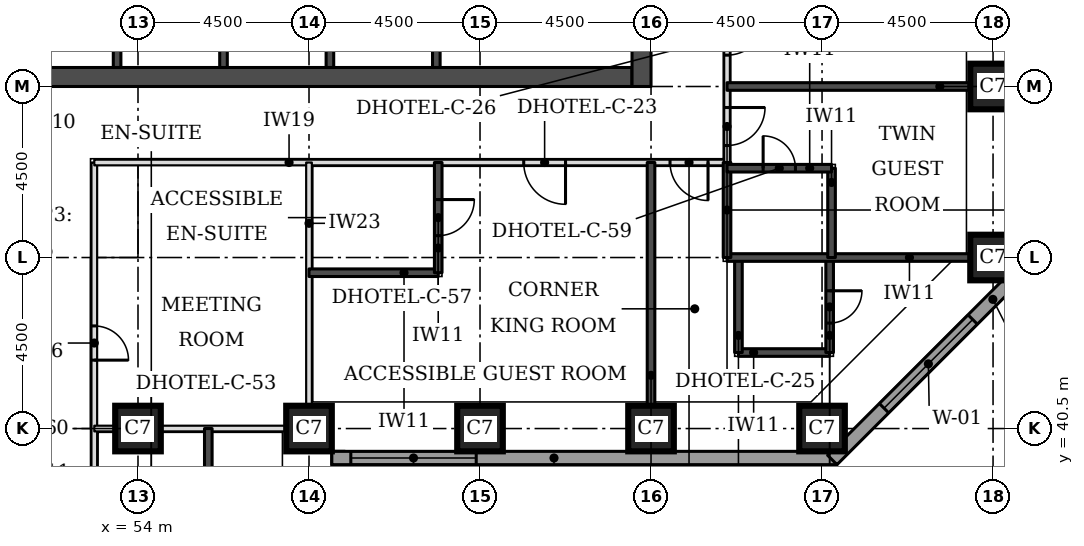
"""IFC4 building model, lengths in metres.
Left out: names, types, materials, properties, quantities, classifications, styles, units other than length and angle.
Written with IfcOpenShell. Run it as: python <this file> out.ifc"""

import sys

from ifc_helpers import new_model, si_unit, direction, frame, frame_2d, origin, origin_2d, place, context, subcontext, project, spatial, rectangle, extrude, element, fill, save


model = new_model("IFC4")
c1 = context("Model", 3, precision=1e-05, world=origin(), true_north=direction((0.0, 1.0)))
c2 = subcontext(c1, "Body", "Model", "MODEL_VIEW")
j1 = project(units=[si_unit("LENGTHUNIT", "METRE"), si_unit("PLANEANGLEUNIT", "RADIAN")], contexts=[c1])
p1 = place(None, origin())
s1 = spatial("IfcSite", under=j1, at=p1, CompositionType="ELEMENT")
p2 = place(p1, origin())
s2 = spatial("IfcBuilding", under=s1, at=p2, CompositionType="ELEMENT")
p3 = place(p2, frame((0.0, 0.0, 33.0)))
s3 = spatial("IfcBuildingStorey", under=s2, at=p3, CompositionType="ELEMENT", Elevation=33.0)
for number, where, z_axis, x_axis in (
    (1, (54.0, 40.5, 0.0), (0.0, 0.0, 1.0), (1.0, 0.0, 0.0)),
    (2, (58.5, 40.5, 0.0), (0.0, 0.0, 1.0), (1.0, 0.0, 0.0)),
    (3, (63.0, 40.5, 0.0), (0.0, 0.0, 1.0), (1.0, 0.0, 0.0)),
    (4, (67.5, 40.5, 0.0), (0.0, 0.0, 1.0), (1.0, 0.0, 0.0)),
    (5, (72.0, 40.5, 0.0), (0.0, 0.0, 1.0), (1.0, 0.0, 0.0)),
    (6, (76.5, 45.0, 0.0), (0.0, 0.0, 1.0), (1.0, 0.0, 0.0)),
    (7, (76.5, 49.5, 0.0), (0.0, 0.0, 1.0), (1.0, 0.0, 0.0)),
):
    element("IfcColumn", number, at=place(p3, frame(where, z_axis=z_axis, x_axis=x_axis)), inside=s3, PredefinedType="COLUMN", context=c2, shape_type="SweptSolid", body=[
        extrude(rectangle(XDim=1.2, YDim=1.2, at=origin_2d()), origin(), (0.0, 0.0, 1.0), 3.3),
    ])
p4 = place(p3, frame((45.5, 49.75, 0.0), z_axis=(0.0, 0.0, 1.0), x_axis=(1.0, 0.0, 0.0)))
e8 = element("IfcWall", 8, at=p4, inside=s3, PredefinedType="SHEAR", context=c2, shape_type="SweptSolid", body=[
    extrude(rectangle(XDim=21.5, YDim=0.5, at=frame_2d((10.75, 0.0))), origin(), (0.0, 0.0, 1.0), 3.3),
])
p5 = place(p3, frame((67.25, 49.5, 0.0), z_axis=(0.0, 0.0, 1.0), x_axis=(0.0, 1.0, 0.0)))
e9 = element("IfcWall", 9, at=p5, inside=s3, PredefinedType="SHEAR", context=c2, shape_type="SweptSolid", body=[
    extrude(rectangle(XDim=22.5, YDim=0.5, at=frame_2d((11.25, 0.0))), origin(), (0.0, 0.0, 1.0), 3.3),
])
p6 = place(p5, frame((4.2, 0.0, 0.0)))
e10 = element("IfcOpeningElement", 10, at=p6, cuts=e9, PredefinedType="OPENING", context=c2, shape_type="SweptSolid", body=[
    extrude(rectangle(XDim=1.8, YDim=2.1, at=frame_2d((0.9, 1.05))), frame((0.0, 0.26, 0.0), z_axis=(0.0, -1.0, 0.0), x_axis=(1.0, 0.0, 0.0)), (0.0, 0.0, 1.0), 0.52),
])
p7 = place(p5, frame((6.9, 0.0, 0.0)))
e11 = element("IfcOpeningElement", 11, at=p7, cuts=e9, PredefinedType="OPENING", context=c2, shape_type="SweptSolid", body=[
    extrude(rectangle(XDim=1.1, YDim=2.1, at=frame_2d((0.55, 1.05))), frame((0.0, 0.26, 0.0), z_axis=(0.0, -1.0, 0.0), x_axis=(1.0, 0.0, 0.0)), (0.0, 0.0, 1.0), 0.52),
])
p8 = place(p5, frame((13.6, 0.0, 0.0)))
e12 = element("IfcOpeningElement", 12, at=p8, cuts=e9, PredefinedType="OPENING", context=c2, shape_type="SweptSolid", body=[
    extrude(rectangle(XDim=1.1, YDim=2.1, at=frame_2d((0.55, 1.05))), frame((0.0, 0.26, 0.0), z_axis=(0.0, -1.0, 0.0), x_axis=(1.0, 0.0, 0.0)), (0.0, 0.0, 1.0), 0.52),
])
p9 = place(p5, frame((16.5, 0.0, 0.0)))
e13 = element("IfcOpeningElement", 13, at=p9, cuts=e9, PredefinedType="OPENING", context=c2, shape_type="SweptSolid", body=[
    extrude(rectangle(XDim=1.8, YDim=2.1, at=frame_2d((0.9, 1.05))), frame((0.0, 0.26, 0.0), z_axis=(0.0, -1.0, 0.0), x_axis=(1.0, 0.0, 0.0)), (0.0, 0.0, 1.0), 0.52),
])
p10 = place(p3, frame((59.275, 22.106, 0.0), z_axis=(0.0, 0.0, 1.0), x_axis=(0.0, 1.0, 0.0)))
e14 = element("IfcWall", 14, at=p10, inside=s3, PredefinedType="STANDARD", context=c2, shape_type="SweptSolid", body=[
    extrude(rectangle(XDim=17.793, YDim=0.35, at=frame_2d((8.897, 0.0))), origin(), (0.0, 0.0, 1.0), 3.055),
])
p11 = place(p10, frame((5.493, 0.0, 0.8)))
e15 = element("IfcOpeningElement", 15, at=p11, cuts=e14, PredefinedType="OPENING", context=c2, shape_type="SweptSolid", body=[
    extrude(rectangle(XDim=3.3, YDim=1.5, at=frame_2d((1.65, 0.75))), frame((0.0, 0.185, 0.0), z_axis=(0.0, -1.0, 0.0), x_axis=(1.0, 0.0, 0.0)), (0.0, 0.0, 1.0), 0.37),
])
p12 = place(p10, frame((13.993, 0.0, 0.8)))
e16 = element("IfcOpeningElement", 16, at=p12, cuts=e14, PredefinedType="OPENING", context=c2, shape_type="SweptSolid", body=[
    extrude(rectangle(XDim=3.3, YDim=1.5, at=frame_2d((1.65, 0.75))), frame((0.0, 0.185, 0.0), z_axis=(0.0, -1.0, 0.0), x_axis=(1.0, 0.0, 0.0)), (0.0, 0.0, 1.0), 0.37),
])
p13 = place(p3, frame((59.1, 39.725, 0.0), z_axis=(0.0, 0.0, 1.0), x_axis=(1.0, 0.0, 0.0)))
e17 = element("IfcWall", 17, at=p13, inside=s3, PredefinedType="STANDARD", context=c2, shape_type="SweptSolid", body=[
    extrude(rectangle(XDim=13.293, YDim=0.35, at=frame_2d((6.647, 0.0))), origin(), (0.0, 0.0, 1.0), 3.055),
])
p14 = place(p13, frame((0.5, 0.0, 0.8)))
e18 = element("IfcOpeningElement", 18, at=p14, cuts=e17, PredefinedType="OPENING", context=c2, shape_type="SweptSolid", body=[
    extrude(rectangle(XDim=3.3, YDim=1.5, at=frame_2d((1.65, 0.75))), frame((0.0, 0.185, 0.0), z_axis=(0.0, -1.0, 0.0), x_axis=(1.0, 0.0, 0.0)), (0.0, 0.0, 1.0), 0.37),
])
p15 = place(p3, frame((72.27, 39.674, 0.0), z_axis=(0.0, 0.0, 1.0), x_axis=(0.707106781187, 0.707106781187, 0.0)))
e19 = element("IfcWall", 19, at=p15, inside=s3, PredefinedType="STANDARD", context=c2, shape_type="SweptSolid", body=[
    extrude(rectangle(XDim=7.151, YDim=0.35, at=frame_2d((3.576, 0.0))), origin(), (0.0, 0.0, 1.0), 3.055),
])
p16 = place(p15, frame((1.926, 0.0, 0.8)))
e20 = element("IfcOpeningElement", 20, at=p16, cuts=e19, PredefinedType="OPENING", context=c2, shape_type="SweptSolid", body=[
    extrude(rectangle(XDim=3.3, YDim=1.5, at=frame_2d((1.65, 0.75))), frame((0.0, 0.185, 0.0), z_axis=(0.0, -1.0, 0.0), x_axis=(1.0, 0.0, 0.0)), (0.0, 0.0, 1.0), 0.37),
])
p17 = place(p3, frame((52.85, 25.15, 0.0), z_axis=(0.0, 0.0, 1.0), x_axis=(0.0, 1.0, 0.0)))
e21 = element("IfcWall", 21, at=p17, inside=s3, PredefinedType="PARTITIONING", context=c2, shape_type="SweptSolid", body=[
    extrude(rectangle(XDim=22.35, YDim=0.15, at=frame_2d((11.175, 0.0))), origin(), (0.0, 0.0, 1.0), 3.08),
])
p18 = place(p17, frame((0.347, 0.0, 0.0)))
e22 = element("IfcOpeningElement", 22, at=p18, cuts=e21, PredefinedType="OPENING", context=c2, shape_type="SweptSolid", body=[
    extrude(rectangle(XDim=1.0, YDim=2.1, at=frame_2d((0.5, 1.05))), frame((0.0, 0.085, 0.0), z_axis=(0.0, -1.0, 0.0), x_axis=(1.0, 0.0, 0.0)), (0.0, 0.0, 1.0), 0.17),
])
p19 = place(p17, frame((7.075, 0.0, 0.0)))
e23 = element("IfcOpeningElement", 23, at=p19, cuts=e21, PredefinedType="OPENING", context=c2, shape_type="SweptSolid", body=[
    extrude(rectangle(XDim=1.0, YDim=2.1, at=frame_2d((0.5, 1.05))), frame((0.0, 0.085, 0.0), z_axis=(0.0, -1.0, 0.0), x_axis=(1.0, 0.0, 0.0)), (0.0, 0.0, 1.0), 0.17),
])
p20 = place(p17, frame((11.425, 0.0, 0.0)))
e24 = element("IfcOpeningElement", 24, at=p20, cuts=e21, PredefinedType="OPENING", context=c2, shape_type="SweptSolid", body=[
    extrude(rectangle(XDim=1.0, YDim=2.1, at=frame_2d((0.5, 1.05))), frame((0.0, 0.085, 0.0), z_axis=(0.0, -1.0, 0.0), x_axis=(1.0, 0.0, 0.0)), (0.0, 0.0, 1.0), 0.17),
])
p21 = place(p17, frame((17.15, 0.0, 0.0)))
e25 = element("IfcOpeningElement", 25, at=p21, cuts=e21, PredefinedType="OPENING", context=c2, shape_type="SweptSolid", body=[
    extrude(rectangle(XDim=0.9, YDim=2.1, at=frame_2d((0.45, 1.05))), frame((0.0, 0.085, 0.0), z_axis=(0.0, -1.0, 0.0), x_axis=(1.0, 0.0, 0.0)), (0.0, 0.0, 1.0), 0.17),
])
p22 = place(p3, frame((52.85, 47.5, 0.0), z_axis=(0.0, 0.0, 1.0), x_axis=(1.0, 0.0, 0.0)))
e26 = element("IfcWall", 26, at=p22, inside=s3, PredefinedType="PARTITIONING", context=c2, shape_type="SweptSolid", body=[
    extrude(rectangle(XDim=16.65, YDim=0.15, at=frame_2d((8.325, 0.0))), origin(), (0.0, 0.0, 1.0), 3.08),
])
p23 = place(p22, frame((11.3, 0.0, 0.0)))
e27 = element("IfcOpeningElement", 27, at=p23, cuts=e26, PredefinedType="OPENING", context=c2, shape_type="SweptSolid", body=[
    extrude(rectangle(XDim=1.1, YDim=2.1, at=frame_2d((0.55, 1.05))), frame((0.0, 0.085, 0.0), z_axis=(0.0, -1.0, 0.0), x_axis=(1.0, 0.0, 0.0)), (0.0, 0.0, 1.0), 0.17),
])
p24 = place(p22, frame((15.15, 0.0, 0.0)))
e28 = element("IfcOpeningElement", 28, at=p24, cuts=e26, PredefinedType="OPENING", context=c2, shape_type="SweptSolid", body=[
    extrude(rectangle(XDim=1.0, YDim=2.1, at=frame_2d((0.5, 1.05))), frame((0.0, 0.085, 0.0), z_axis=(0.0, -1.0, 0.0), x_axis=(1.0, 0.0, 0.0)), (0.0, 0.0, 1.0), 0.17),
])
p25 = place(p3, frame((69.5, 47.5, 0.0), z_axis=(0.0, 0.0, 1.0), x_axis=(0.0, 1.0, 0.0)))
e29 = element("IfcWall", 29, at=p25, inside=s3, PredefinedType="PARTITIONING", context=c2, shape_type="SweptSolid", body=[
    extrude(rectangle(XDim=26.5, YDim=0.15, at=frame_2d((13.25, 0.0))), origin(), (0.0, 0.0, 1.0), 3.08),
])
p26 = place(p25, frame((25.053, 0.0, 0.0)))
e30 = element("IfcOpeningElement", 30, at=p26, cuts=e29, PredefinedType="OPENING", context=c2, shape_type="SweptSolid", body=[
    extrude(rectangle(XDim=1.0, YDim=2.1, at=frame_2d((0.5, 1.05))), frame((0.0, 0.085, 0.0), z_axis=(0.0, -1.0, 0.0), x_axis=(1.0, 0.0, 0.0)), (0.0, 0.0, 1.0), 0.17),
])
p27 = place(p25, frame((18.275, 0.0, 0.0)))
e31 = element("IfcOpeningElement", 31, at=p27, cuts=e29, PredefinedType="OPENING", context=c2, shape_type="SweptSolid", body=[
    extrude(rectangle(XDim=1.0, YDim=2.1, at=frame_2d((0.5, 1.05))), frame((0.0, 0.085, 0.0), z_axis=(0.0, -1.0, 0.0), x_axis=(1.0, 0.0, 0.0)), (0.0, 0.0, 1.0), 0.17),
])
p28 = place(p25, frame((12.15, 0.0, 0.0)))
e32 = element("IfcOpeningElement", 32, at=p28, cuts=e29, PredefinedType="OPENING", context=c2, shape_type="SweptSolid", body=[
    extrude(rectangle(XDim=1.1, YDim=2.1, at=frame_2d((0.55, 1.05))), frame((0.0, 0.085, 0.0), z_axis=(0.0, -1.0, 0.0), x_axis=(1.0, 0.0, 0.0)), (0.0, 0.0, 1.0), 0.17),
])
p29 = place(p25, frame((2.825, 0.0, 0.0)))
e33 = element("IfcOpeningElement", 33, at=p29, cuts=e29, PredefinedType="OPENING", context=c2, shape_type="SweptSolid", body=[
    extrude(rectangle(XDim=1.0, YDim=2.1, at=frame_2d((0.5, 1.05))), frame((0.0, 0.085, 0.0), z_axis=(0.0, -1.0, 0.0), x_axis=(1.0, 0.0, 0.0)), (0.0, 0.0, 1.0), 0.17),
])
p30 = place(p25, frame((0.447, 0.0, 0.0)))
e34 = element("IfcOpeningElement", 34, at=p30, cuts=e29, PredefinedType="OPENING", context=c2, shape_type="SweptSolid", body=[
    extrude(rectangle(XDim=1.0, YDim=2.1, at=frame_2d((0.5, 1.05))), frame((0.0, 0.085, 0.0), z_axis=(0.0, -1.0, 0.0), x_axis=(1.0, 0.0, 0.0)), (0.0, 0.0, 1.0), 0.17),
])
p31 = place(p3, frame((55.85, 38.15, 0.0), z_axis=(0.0, 0.0, 1.0), x_axis=(0.0, 1.0, 0.0)))
e35 = element("IfcWall", 35, at=p31, inside=s3, PredefinedType="SOLIDWALL", context=c2, shape_type="SweptSolid", body=[
    extrude(rectangle(XDim=2.35, YDim=0.2, at=frame_2d((1.175, 0.0))), origin(), (0.0, 0.0, 1.0), 3.08),
])
p32 = place(p3, frame((67.5, 41.1, 0.0), z_axis=(0.0, 0.0, 1.0), x_axis=(0.0, 1.0, 0.0)))
e36 = element("IfcWall", 36, at=p32, inside=s3, PredefinedType="SOLIDWALL", context=c2, shape_type="SweptSolid", body=[
    extrude(rectangle(XDim=6.4, YDim=0.2, at=frame_2d((3.2, 0.0))), origin(), (0.0, 0.0, 1.0), 3.08),
])
p33 = place(p3, frame((69.8, 42.5, 0.0), z_axis=(0.0, 0.0, 1.0), x_axis=(1.0, 0.0, 0.0)))
e37 = element("IfcWall", 37, at=p33, inside=s3, PredefinedType="SOLIDWALL", context=c2, shape_type="SweptSolid", body=[
    extrude(rectangle(XDim=2.4, YDim=0.2, at=frame_2d((1.2, 0.0))), origin(), (0.0, 0.0, 1.0), 3.08),
])
p34 = place(p3, frame((69.8, 42.5, 0.0), z_axis=(0.0, 0.0, 1.0), x_axis=(0.0, 1.0, 0.0)))
e38 = element("IfcWall", 38, at=p34, inside=s3, PredefinedType="SOLIDWALL", context=c2, shape_type="SweptSolid", body=[
    extrude(rectangle(XDim=2.5, YDim=0.2, at=frame_2d((1.25, 0.0))), origin(), (0.0, 0.0, 1.0), 3.08),
])
p35 = place(p3, frame((72.2, 42.5, 0.0), z_axis=(0.0, 0.0, 1.0), x_axis=(0.0, 1.0, 0.0)))
e39 = element("IfcWall", 39, at=p35, inside=s3, PredefinedType="SOLIDWALL", context=c2, shape_type="SweptSolid", body=[
    extrude(rectangle(XDim=2.5, YDim=0.2, at=frame_2d((1.25, 0.0))), origin(), (0.0, 0.0, 1.0), 3.08),
])
p36 = place(p35, frame((0.775, 0.0, 0.0)))
e40 = element("IfcOpeningElement", 40, at=p36, cuts=e39, PredefinedType="OPENING", context=c2, shape_type="SweptSolid", body=[
    extrude(rectangle(XDim=0.85, YDim=2.1, at=frame_2d((0.425, 1.05))), frame((0.0, 0.11, 0.0), z_axis=(0.0, -1.0, 0.0), x_axis=(1.0, 0.0, 0.0)), (0.0, 0.0, 1.0), 0.22),
])
p37 = place(p3, frame((58.5, 44.6, 0.0), z_axis=(0.0, 0.0, 1.0), x_axis=(1.0, 0.0, 0.0)))
e41 = element("IfcWall", 41, at=p37, inside=s3, PredefinedType="SOLIDWALL", context=c2, shape_type="SweptSolid", body=[
    extrude(rectangle(XDim=3.4, YDim=0.2, at=frame_2d((1.7, 0.0))), origin(), (0.0, 0.0, 1.0), 3.08),
])
p38 = place(p3, frame((61.9, 44.6, 0.0), z_axis=(0.0, 0.0, 1.0), x_axis=(0.0, 1.0, 0.0)))
e42 = element("IfcWall", 42, at=p38, inside=s3, PredefinedType="SOLIDWALL", context=c2, shape_type="SweptSolid", body=[
    extrude(rectangle(XDim=2.9, YDim=0.2, at=frame_2d((1.45, 0.0))), origin(), (0.0, 0.0, 1.0), 3.08),
])
p39 = place(p38, frame((0.975, 0.0, 0.0)))
e43 = element("IfcOpeningElement", 43, at=p39, cuts=e42, PredefinedType="OPENING", context=c2, shape_type="SweptSolid", body=[
    extrude(rectangle(XDim=0.95, YDim=2.1, at=frame_2d((0.475, 1.05))), frame((0.0, 0.11, 0.0), z_axis=(0.0, -1.0, 0.0), x_axis=(1.0, 0.0, 0.0)), (0.0, 0.0, 1.0), 0.22),
])
p40 = place(p3, frame((69.5, 45.0, 0.0), z_axis=(0.0, 0.0, 1.0), x_axis=(1.0, 0.0, 0.0)))
e44 = element("IfcWall", 44, at=p40, inside=s3, PredefinedType="SOLIDWALL", context=c2, shape_type="SweptSolid", body=[
    extrude(rectangle(XDim=6.4, YDim=0.2, at=frame_2d((3.2, 0.0))), origin(), (0.0, 0.0, 1.0), 3.08),
])
p41 = place(p3, frame((69.5, 45.0, 0.0), z_axis=(0.0, 0.0, 1.0), x_axis=(0.0, 1.0, 0.0)))
e45 = element("IfcWall", 45, at=p41, inside=s3, PredefinedType="SOLIDWALL", context=c2, shape_type="SweptSolid", body=[
    extrude(rectangle(XDim=2.5, YDim=0.2, at=frame_2d((1.25, 0.0))), origin(), (0.0, 0.0, 1.0), 3.08),
])
p42 = place(p3, frame((72.25, 45.0, 0.0), z_axis=(0.0, 0.0, 1.0), x_axis=(0.0, 1.0, 0.0)))
e46 = element("IfcWall", 46, at=p42, inside=s3, PredefinedType="SOLIDWALL", context=c2, shape_type="SweptSolid", body=[
    extrude(rectangle(XDim=2.35, YDim=0.2, at=frame_2d((1.175, 0.0))), origin(), (0.0, 0.0, 1.0), 3.08),
])
p43 = place(p3, frame((69.5, 47.35, 0.0), z_axis=(0.0, 0.0, 1.0), x_axis=(1.0, 0.0, 0.0)))
e47 = element("IfcWall", 47, at=p43, inside=s3, PredefinedType="SOLIDWALL", context=c2, shape_type="SweptSolid", body=[
    extrude(rectangle(XDim=2.75, YDim=0.2, at=frame_2d((1.375, 0.0))), origin(), (0.0, 0.0, 1.0), 3.08),
])
p44 = place(p43, frame((0.95, 0.0, 0.0)))
e48 = element("IfcOpeningElement", 48, at=p44, cuts=e47, PredefinedType="OPENING", context=c2, shape_type="SweptSolid", body=[
    extrude(rectangle(XDim=0.85, YDim=2.1, at=frame_2d((0.425, 1.05))), frame((0.0, 0.11, 0.0), z_axis=(0.0, -1.0, 0.0), x_axis=(1.0, 0.0, 0.0)), (0.0, 0.0, 1.0), 0.22),
])
p45 = place(p3, frame((69.5, 49.5, 0.0), z_axis=(0.0, 0.0, 1.0), x_axis=(1.0, 0.0, 0.0)))
e49 = element("IfcWall", 49, at=p45, inside=s3, PredefinedType="SOLIDWALL", context=c2, shape_type="SweptSolid", body=[
    extrude(rectangle(XDim=6.4, YDim=0.2, at=frame_2d((3.2, 0.0))), origin(), (0.0, 0.0, 1.0), 3.08),
])
p46 = place(p3, frame((52.85, 40.5, 0.0), z_axis=(0.0, 0.0, 1.0), x_axis=(1.0, 0.0, 0.0)))
e50 = element("IfcWall", 50, at=p46, inside=s3, PredefinedType="PARTITIONING", context=c2, shape_type="SweptSolid", body=[
    extrude(rectangle(XDim=5.05, YDim=0.15, at=frame_2d((2.525, 0.0))), origin(), (0.0, 0.0, 1.0), 2.33),
])
p47 = place(p3, frame((58.5, 41.1, 0.0), z_axis=(0.0, 0.0, 1.0), x_axis=(0.0, 1.0, 0.0)))
e51 = element("IfcWall", 51, at=p47, inside=s3, PredefinedType="PARTITIONING", context=c2, shape_type="SweptSolid", body=[
    extrude(rectangle(XDim=6.4, YDim=0.15, at=frame_2d((3.2, 0.0))), origin(), (0.0, 0.0, 1.0), 3.08),
])
for number, where, z_axis, x_axis in (
    (52, (53.45, 50.0, 0.0), (0.0, 0.0, 1.0), (0.0, 1.0, 0.0)),
    (53, (56.25, 50.0, 0.0), (0.0, 0.0, 1.0), (0.0, 1.0, 0.0)),
    (54, (59.05, 50.0, 0.0), (0.0, 0.0, 1.0), (0.0, 1.0, 0.0)),
    (55, (61.85, 50.0, 0.0), (0.0, 0.0, 1.0), (0.0, 1.0, 0.0)),
):
    element("IfcWall", number, at=place(p3, frame(where, z_axis=z_axis, x_axis=x_axis)), inside=s3, PredefinedType="SOLIDWALL", context=c2, shape_type="SweptSolid", body=[
        extrude(rectangle(XDim=3.0, YDim=0.2, at=frame_2d((1.5, 0.0))), origin(), (0.0, 0.0, 1.0), 3.08),
    ])
p48 = place(p14, origin())
e56 = element("IfcWindow", 56, at=p48, inside=s3, PartitioningType="SINGLE_PANEL", PredefinedType="WINDOW", context=c2, shape_type="SweptSolid", body=[
    extrude(rectangle(XDim=3.3, YDim=1.5, at=frame_2d((1.65, 0.75))), frame((0.0, 0.085, 0.0), z_axis=(0.0, -1.0, 0.0), x_axis=(1.0, 0.0, 0.0)), (0.0, 0.0, 1.0), 0.06),
])
fill(e18, e56)
p49 = place(p16, origin())
e57 = element("IfcWindow", 57, at=p49, inside=s3, PartitioningType="SINGLE_PANEL", PredefinedType="WINDOW", context=c2, shape_type="SweptSolid", body=[
    extrude(rectangle(XDim=3.3, YDim=1.5, at=frame_2d((1.65, 0.75))), frame((0.0, 0.085, 0.0), z_axis=(0.0, -1.0, 0.0), x_axis=(1.0, 0.0, 0.0)), (0.0, 0.0, 1.0), 0.06),
])
fill(e20, e57)
p50 = place(p29, frame((1.0, 0.0, 0.0), z_axis=(0.0, 0.0, 1.0), x_axis=(-1.0, 0.0, 0.0)))
e58 = element("IfcDoor", 58, at=p50, inside=s3, OperationType="SINGLE_SWING_LEFT", PredefinedType="DOOR", context=c2, shape_type="SweptSolid", body=[
    extrude(rectangle(XDim=1.0, YDim=2.1, at=frame_2d((0.5, 1.05))), frame((0.0, 0.025, 0.0), z_axis=(0.0, -1.0, 0.0), x_axis=(1.0, 0.0, 0.0)), (0.0, 0.0, 1.0), 0.05),
])
fill(e33, e58)
p51 = place(p30, frame((1.0, 0.0, 0.0), z_axis=(0.0, 0.0, 1.0), x_axis=(-1.0, 0.0, 0.0)))
e59 = element("IfcDoor", 59, at=p51, inside=s3, OperationType="SINGLE_SWING_LEFT", PredefinedType="DOOR", context=c2, shape_type="SweptSolid", body=[
    extrude(rectangle(XDim=1.0, YDim=2.1, at=frame_2d((0.5, 1.05))), frame((0.0, 0.025, 0.0), z_axis=(0.0, -1.0, 0.0), x_axis=(1.0, 0.0, 0.0)), (0.0, 0.0, 1.0), 0.05),
])
fill(e34, e59)
p52 = place(p44, origin())
e60 = element("IfcDoor", 60, at=p52, inside=s3, OperationType="SINGLE_SWING_LEFT", PredefinedType="DOOR", context=c2, shape_type="SweptSolid", body=[
    extrude(rectangle(XDim=0.85, YDim=2.1, at=frame_2d((0.425, 1.05))), frame((0.0, 0.025, 0.0), z_axis=(0.0, -1.0, 0.0), x_axis=(1.0, 0.0, 0.0)), (0.0, 0.0, 1.0), 0.05),
])
fill(e48, e60)
p53 = place(p23, frame((1.1, 0.0, 0.0), z_axis=(0.0, 0.0, 1.0), x_axis=(-1.0, 0.0, 0.0)))
e61 = element("IfcDoor", 61, at=p53, inside=s3, OperationType="SINGLE_SWING_LEFT", PredefinedType="DOOR", context=c2, shape_type="SweptSolid", body=[
    extrude(rectangle(XDim=1.1, YDim=2.1, at=frame_2d((0.55, 1.05))), frame((0.0, 0.025, 0.0), z_axis=(0.0, -1.0, 0.0), x_axis=(1.0, 0.0, 0.0)), (0.0, 0.0, 1.0), 0.05),
])
fill(e27, e61)
p54 = place(p39, frame((0.95, 0.0, 0.0), z_axis=(0.0, 0.0, 1.0), x_axis=(-1.0, 0.0, 0.0)))
e62 = element("IfcDoor", 62, at=p54, inside=s3, OperationType="SINGLE_SWING_LEFT", PredefinedType="DOOR", context=c2, shape_type="SweptSolid", body=[
    extrude(rectangle(XDim=0.95, YDim=2.1, at=frame_2d((0.475, 1.05))), frame((0.0, 0.025, 0.0), z_axis=(0.0, -1.0, 0.0), x_axis=(1.0, 0.0, 0.0)), (0.0, 0.0, 1.0), 0.05),
])
fill(e43, e62)
p55 = place(p24, frame((1.0, 0.0, 0.0), z_axis=(0.0, 0.0, 1.0), x_axis=(-1.0, 0.0, 0.0)))
e63 = element("IfcDoor", 63, at=p55, inside=s3, OperationType="SINGLE_SWING_LEFT", PredefinedType="DOOR", context=c2, shape_type="SweptSolid", body=[
    extrude(rectangle(XDim=1.0, YDim=2.1, at=frame_2d((0.5, 1.05))), frame((0.0, 0.025, 0.0), z_axis=(0.0, -1.0, 0.0), x_axis=(1.0, 0.0, 0.0)), (0.0, 0.0, 1.0), 0.05),
])
fill(e28, e63)
p56 = place(p36, frame((0.85, 0.0, 0.0), z_axis=(0.0, 0.0, 1.0), x_axis=(-1.0, 0.0, 0.0)))
e64 = element("IfcDoor", 64, at=p56, inside=s3, OperationType="SINGLE_SWING_LEFT", PredefinedType="DOOR", context=c2, shape_type="SweptSolid", body=[
    extrude(rectangle(XDim=0.85, YDim=2.1, at=frame_2d((0.425, 1.05))), frame((0.0, 0.025, 0.0), z_axis=(0.0, -1.0, 0.0), x_axis=(1.0, 0.0, 0.0)), (0.0, 0.0, 1.0), 0.05),
])
fill(e40, e64)
p57 = place(p21, frame((0.9, 0.0, 0.0), z_axis=(0.0, 0.0, 1.0), x_axis=(-1.0, 0.0, 0.0)))
e65 = element("IfcDoor", 65, at=p57, inside=s3, OperationType="SINGLE_SWING_RIGHT", PredefinedType="DOOR", context=c2, shape_type="SweptSolid", body=[
    extrude(rectangle(XDim=0.9, YDim=2.1, at=frame_2d((0.45, 1.05))), frame((0.0, 0.025, 0.0), z_axis=(0.0, -1.0, 0.0), x_axis=(1.0, 0.0, 0.0)), (0.0, 0.0, 1.0), 0.05),
])
fill(e25, e65)
save(model, sys.argv[1])
